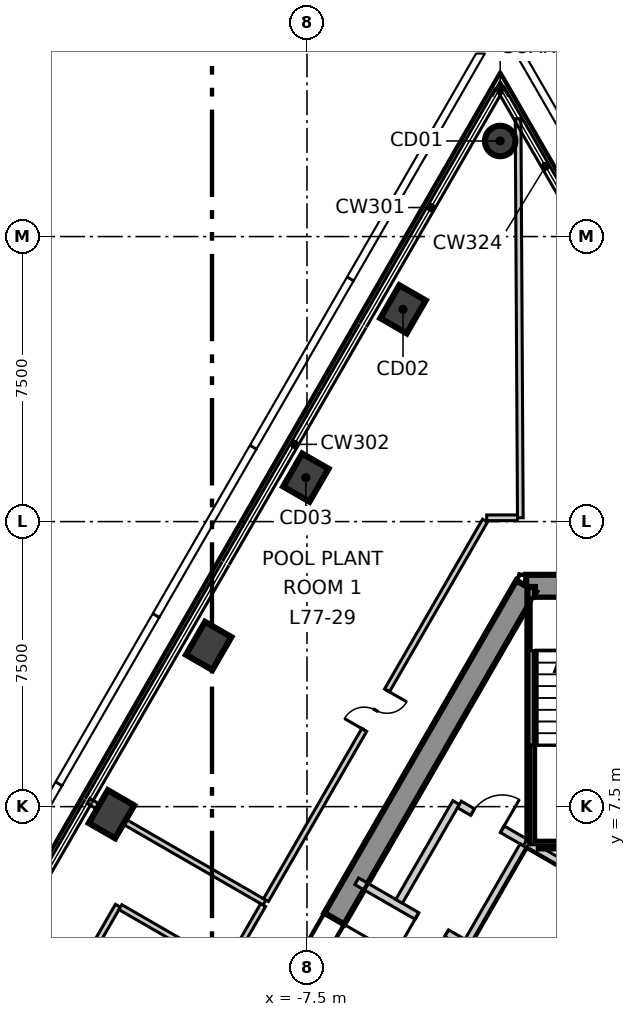
"""IFC4 building model, lengths in metres.
Left out: names, types, materials, properties, quantities, classifications, styles, units other than length and angle.
Written with IfcOpenShell. Run it as: python <this file> out.ifc"""

import sys

from ifc_helpers import new_model, si_unit, direction, frame, frame_2d, origin, origin_2d, place, context, subcontext, project, spatial, polyline, rectangle, circle, outline, extrude, element, fill, save


model = new_model("IFC4")
c1 = context("Model", 3, precision=1e-05, world=origin(), true_north=direction((0.0, 1.0)))
c2 = subcontext(c1, "Body", "Model", "MODEL_VIEW")
j1 = project(units=[si_unit("LENGTHUNIT", "METRE"), si_unit("PLANEANGLEUNIT", "RADIAN")], contexts=[c1])
p1 = place(None, origin())
s1 = spatial("IfcSite", under=j1, at=p1, CompositionType="ELEMENT")
p2 = place(p1, origin())
s2 = spatial("IfcBuilding", under=s1, at=p2, CompositionType="ELEMENT")
p3 = place(p2, frame((0.0, 0.0, 322.3)))
s3 = spatial("IfcBuildingStorey", under=s2, at=p3, CompositionType="ELEMENT", Elevation=322.3)
p4 = place(p3, frame((1.732, 13.3, -0.3), z_axis=(0.0, 0.0, 1.0), x_axis=(-1.0, 0.0, 0.0)))
e1 = element("IfcWall", 1, at=p4, inside=s3, PredefinedType="SHEAR", context=c2, shape_type="SweptSolid", body=[
    extrude(outline(polyline([(-0.173, -0.3), (1.732, -0.3), (3.637, -0.3), (3.291, 0.3), (1.732, 0.3), (0.173, 0.3), (-0.173, -0.3)])), origin(), (0.0, 0.0, 1.0), 5.35),
])
p5 = place(p4, frame((1.032, 0.0, 0.3)))
e2 = element("IfcOpeningElement", 2, at=p5, cuts=e1, PredefinedType="OPENING", context=c2, shape_type="SweptSolid", body=[
    extrude(rectangle(XDim=1.4, YDim=2.1, at=frame_2d((0.7, 1.05))), frame((0.0, 0.31, 0.0), z_axis=(0.0, -1.0, 0.0), x_axis=(1.0, 0.0, 0.0)), (0.0, 0.0, 1.0), 0.62),
])
p6 = place(p3, frame((-1.732, 13.3, -0.3), z_axis=(0.0, 0.0, 1.0), x_axis=(-0.500000539815, -0.866025092122, 0.0)))
e3 = element("IfcWall", 3, at=p6, inside=s3, PredefinedType="SHEAR", context=c2, shape_type="SweptSolid", body=[
    extrude(outline(polyline([(-0.173, -0.3), (1.795, -0.3), (3.763, -0.3), (5.732, -0.3), (7.7, -0.3), (9.668, -0.301), (11.637, -0.301), (13.605, -0.301), (15.573, -0.301), (17.542, -0.301), (19.51, -0.301), (21.478, -0.301), (21.131, 0.3), (19.226, 0.3), (17.321, 0.3), (15.415, 0.3), (13.51, 0.3), (11.605, 0.3), (9.699, 0.3), (7.794, 0.3), (5.889, 0.3), (3.984, 0.3), (2.078, 0.3), (0.173, 0.3), (-0.173, -0.3)])), origin(), (0.0, 0.0, 1.0), 5.35),
])
p7 = place(p6, frame((10.102, 0.0, 0.3)))
e4 = element("IfcOpeningElement", 4, at=p7, cuts=e3, PredefinedType="OPENING", context=c2, shape_type="SweptSolid", body=[
    extrude(rectangle(XDim=1.1, YDim=2.1, at=frame_2d((0.55, 1.05))), frame((0.0, 0.31, 0.0), z_axis=(0.0, -1.0, 0.0), x_axis=(1.0, 0.0, 0.0)), (0.0, 0.0, 1.0), 0.621),
])
p8 = place(p6, frame((16.378, 0.0, 0.3)))
e5 = element("IfcOpeningElement", 5, at=p8, cuts=e3, PredefinedType="OPENING", context=c2, shape_type="SweptSolid", body=[
    extrude(rectangle(XDim=0.9, YDim=2.1, at=frame_2d((0.45, 1.05))), frame((0.0, 0.31, 0.0), z_axis=(0.0, -1.0, 0.0), x_axis=(1.0, 0.0, 0.0)), (0.0, 0.0, 1.0), 0.621),
])
p9 = place(p3, frame((-2.416, 25.015, -0.3), z_axis=(0.0, 0.0, 1.0), x_axis=(0.5, 0.866025403784, 0.0)))
e6 = element("IfcColumn", 6, at=p9, inside=s3, PredefinedType="COLUMN", context=c2, shape_type="SweptSolid", body=[
    extrude(circle(Radius=0.4, at=origin_2d()), origin(), (0.0, 0.0, 1.0), 5.35),
])
for number, where, z_axis, x_axis in (
    (7, (-4.973, 20.586, -0.3), (0.0, 0.0, 1.0), (0.5, 0.866, 0.0)),
    (8, (-7.53, 16.157, -0.3), (0.0, 0.0, 1.0), (0.5, 0.866, 0.0)),
    (9, (-10.087, 11.729, -0.3), (0.0, 0.0, 1.0), (0.5, 0.866, 0.0)),
    (10, (-12.644, 7.3, -0.3), (0.0, 0.0, 1.0), (0.5, 0.866, 0.0)),
):
    element("IfcColumn", number, at=place(p3, frame(where, z_axis=z_axis, x_axis=x_axis)), inside=s3, PredefinedType="COLUMN", context=c2, shape_type="SweptSolid", body=[
        extrude(rectangle(XDim=1.0, YDim=0.8, at=origin_2d()), origin(), (0.0, 0.0, 1.0), 5.35),
    ])
p10 = place(p3, frame((-13.25, 7.65, 0.0), z_axis=(0.0, 0.0, 1.0), x_axis=(0.866032834954, -0.499987128616, 0.0)))
e11 = element("IfcWall", 11, at=p10, inside=s3, PredefinedType="PARTITIONING", context=c2, shape_type="SweptSolid", body=[
    extrude(rectangle(XDim=5.35, YDim=0.15, at=frame_2d((2.675, 0.0))), origin(), (0.0, 0.0, 1.0), 5.05),
])
p11 = place(p3, frame((-1.945, 25.6, 0.0), z_axis=(0.0, 0.0, 1.0), x_axis=(0.005626771044, -0.999984169599, 0.0)))
e12 = element("IfcWall", 12, at=p11, inside=s3, PredefinedType="PARTITIONING", context=c2, shape_type="SweptSolid", body=[
    extrude(rectangle(XDim=10.5, YDim=0.15, at=frame_2d((5.25, 0.0))), origin(), (0.0, 0.0, 1.0), 5.05),
])
p12 = place(p3, frame((-2.771, 15.1, 0.0), z_axis=(0.0, 0.0, 1.0), x_axis=(1.0, 0.0, 0.0)))
e13 = element("IfcWall", 13, at=p12, inside=s3, PredefinedType="PARTITIONING", context=c2, shape_type="SweptSolid", body=[
    extrude(rectangle(XDim=0.81, YDim=0.15, at=frame_2d((0.405, 0.0))), origin(), (0.0, 0.0, 1.0), 5.05),
])
p13 = place(p3, frame((-8.579, 5.04, 0.0), z_axis=(0.0, 0.0, 1.0), x_axis=(0.499960750514, 0.8660480633, 0.0)))
e14 = element("IfcWall", 14, at=p13, inside=s3, PredefinedType="PARTITIONING", context=c2, shape_type="SweptSolid", body=[
    extrude(rectangle(XDim=11.529, YDim=0.15, at=frame_2d((5.765, 0.0))), origin(), (0.0, 0.0, 1.0), 5.05),
])
p14 = place(p13, frame((5.17, 0.0, 0.0)))
e15 = element("IfcOpeningElement", 15, at=p14, cuts=e14, PredefinedType="OPENING", context=c2, shape_type="SweptSolid", body=[
    extrude(rectangle(XDim=1.2, YDim=2.1, at=frame_2d((0.6, 1.05))), frame((0.0, 0.085, 0.0), z_axis=(0.0, -1.0, 0.0), x_axis=(1.0, 0.0, 0.0)), (0.0, 0.0, 1.0), 0.17),
])
p15 = place(p3, frame((-14.463, -5.15, 0.0), z_axis=(0.0, 0.0, 1.0), x_axis=(0.50005173435, 0.865995532883, 0.0)))
e16 = element("IfcWall", 16, at=p15, inside=s3, PredefinedType="PARTITIONING", context=c2, shape_type="SweptSolid", body=[
    extrude(rectangle(XDim=11.616, YDim=0.15, at=frame_2d((5.808, 0.0))), origin(), (0.0, 0.0, 1.0), 5.05),
])
p16 = place(p15, frame((7.542, 0.0, 0.0)))
e17 = element("IfcOpeningElement", 17, at=p16, cuts=e16, PredefinedType="OPENING", context=c2, shape_type="SweptSolid", body=[
    extrude(rectangle(XDim=1.0, YDim=2.1, at=frame_2d((0.5, 1.05))), frame((0.0, 0.085, 0.0), z_axis=(0.0, -1.0, 0.0), x_axis=(1.0, 0.0, 0.0)), (0.0, 0.0, 1.0), 0.17),
])
p17 = place(p3, frame((-14.087, 2.1, 0.0), z_axis=(0.0, 0.0, 1.0), x_axis=(0.499836055896, 0.866120036269, 0.0)))
e18 = element("IfcWall", 18, at=p17, inside=s3, PredefinedType="PARTITIONING", context=c2, shape_type="SweptSolid", body=[
    extrude(rectangle(XDim=3.225, YDim=0.15, at=frame_2d((1.612, 0.0))), origin(), (0.0, 0.0, 1.0), 5.05),
])
p18 = place(p3, frame((-12.41, 4.855, 0.0), z_axis=(0.0, 0.0, 1.0), x_axis=(0.866035871367, -0.499981869177, 0.0)))
e19 = element("IfcWall", 19, at=p18, inside=s3, PredefinedType="PARTITIONING", context=c2, shape_type="SweptSolid", body=[
    extrude(rectangle(XDim=3.15, YDim=0.15, at=frame_2d((1.575, 0.0))), origin(), (0.0, 0.0, 1.0), 5.05),
])
p19 = place(p3, frame((-6.191, 5.537, 0.0), z_axis=(0.0, 0.0, 1.0), x_axis=(0.866052607023, -0.499952879648, 0.0)))
e20 = element("IfcWall", 20, at=p19, inside=s3, PredefinedType="SOLIDWALL", context=c2, shape_type="SweptSolid", body=[
    extrude(rectangle(XDim=3.332, YDim=0.2, at=frame_2d((1.666, 0.0))), origin(), (0.0, 0.0, 1.0), 5.05),
])
p20 = place(p19, frame((1.83, 0.0, 0.0)))
e21 = element("IfcOpeningElement", 21, at=p20, cuts=e20, PredefinedType="OPENING", context=c2, shape_type="SweptSolid", body=[
    extrude(rectangle(XDim=0.9, YDim=2.1, at=frame_2d((0.45, 1.05))), frame((0.0, 0.11, 0.0), z_axis=(0.0, -1.0, 0.0), x_axis=(1.0, 0.0, 0.0)), (0.0, 0.0, 1.0), 0.22),
])
p21 = place(p3, frame((-5.076, 5.009, 0.0), z_axis=(0.0, 0.0, 1.0), x_axis=(0.50002537861, 0.866010750942, 0.0)))
e22 = element("IfcWall", 22, at=p21, inside=s3, PredefinedType="SOLIDWALL", context=c2, shape_type="SweptSolid", body=[
    extrude(rectangle(XDim=3.0, YDim=0.2, at=frame_2d((1.5, 0.0))), origin(), (0.0, 0.0, 1.0), 5.05),
])
p22 = place(p3, frame((-3.489, 7.557, 0.0), z_axis=(0.0, 0.0, 1.0), x_axis=(0.866010750942, -0.50002537861, 0.0)))
e23 = element("IfcWall", 23, at=p22, inside=s3, PredefinedType="SOLIDWALL", context=c2, shape_type="SweptSolid", body=[
    extrude(rectangle(XDim=2.0, YDim=0.2, at=frame_2d((1.0, 0.0))), origin(), (0.0, 0.0, 1.0), 5.05),
])
p23 = place(p22, frame((0.401, 0.0, 0.0)))
e24 = element("IfcOpeningElement", 24, at=p23, cuts=e23, PredefinedType="OPENING", context=c2, shape_type="SweptSolid", body=[
    extrude(rectangle(XDim=0.9, YDim=2.1, at=frame_2d((0.45, 1.05))), frame((0.0, 0.11, 0.0), z_axis=(0.0, -1.0, 0.0), x_axis=(1.0, 0.0, 0.0)), (0.0, 0.0, 1.0), 0.22),
])
p24 = place(p3, frame((-3.257, 3.959, 0.0), z_axis=(0.0, 0.0, 1.0), x_axis=(0.50012328804, 0.865954211699, 0.0)))
e25 = element("IfcWall", 25, at=p24, inside=s3, PredefinedType="SOLIDWALL", context=c2, shape_type="SweptSolid", body=[
    extrude(rectangle(XDim=2.9, YDim=0.2, at=frame_2d((1.45, 0.0))), origin(), (0.0, 0.0, 1.0), 5.05),
])
p25 = place(p3, frame((-1.67, 6.507, 0.0), z_axis=(0.0, 0.0, 1.0), x_axis=(0.865941441609, -0.500145398563, 0.0)))
e26 = element("IfcWall", 26, at=p25, inside=s3, PredefinedType="SOLIDWALL", context=c2, shape_type="SweptSolid", body=[
    extrude(rectangle(XDim=1.815, YDim=0.2, at=frame_2d((0.908, 0.0))), origin(), (0.0, 0.0, 1.0), 5.05),
])
p26 = place(p3, frame((-1.438, 2.909, 0.0), z_axis=(0.0, 0.0, 1.0), x_axis=(0.499829630636, 0.866123744241, 0.0)))
e27 = element("IfcWall", 27, at=p26, inside=s3, PredefinedType="SOLIDWALL", context=c2, shape_type="SweptSolid", body=[
    extrude(rectangle(XDim=2.761, YDim=0.2, at=frame_2d((1.38, 0.0))), origin(), (0.0, 0.0, 1.0), 5.05),
])
p27 = place(p3, frame((-1.4, 6.5, 0.0), z_axis=(0.0, 0.0, 1.0), x_axis=(1.0, 0.0, 0.0)))
e28 = element("IfcWall", 28, at=p27, inside=s3, PredefinedType="SOLIDWALL", context=c2, shape_type="SweptSolid", body=[
    extrude(rectangle(XDim=2.8, YDim=0.2, at=frame_2d((1.4, 0.0))), origin(), (0.0, 0.0, 1.0), 5.05),
])
p28 = place(p3, frame((-1.6, 6.615, 0.0), z_axis=(0.0, 0.0, 1.0), x_axis=(0.0, 1.0, 0.0)))
e29 = element("IfcWall", 29, at=p28, inside=s3, PredefinedType="SOLIDWALL", context=c2, shape_type="SweptSolid", body=[
    extrude(rectangle(XDim=6.665, YDim=0.2, at=frame_2d((3.333, 0.0))), origin(), (0.0, 0.0, 1.0), 5.05),
])
p29 = place(p20, origin())
e30 = element("IfcDoor", 30, at=p29, inside=s3, OperationType="SINGLE_SWING_LEFT", PredefinedType="DOOR", context=c2, shape_type="SweptSolid", body=[
    extrude(rectangle(XDim=0.9, YDim=2.1, at=frame_2d((0.45, 1.05))), frame((0.0, 0.025, 0.0), z_axis=(0.0, -1.0, 0.0), x_axis=(1.0, 0.0, 0.0)), (0.0, 0.0, 1.0), 0.05),
])
fill(e21, e30)
p30 = place(p14, origin())
e31 = element("IfcDoor", 31, at=p30, inside=s3, OperationType="DOUBLE_DOOR_SINGLE_SWING", PredefinedType="DOOR", context=c2, shape_type="SweptSolid", body=[
    extrude(rectangle(XDim=1.2, YDim=2.1, at=frame_2d((0.6, 1.05))), frame((0.0, 0.025, 0.0), z_axis=(0.0, -1.0, 0.0), x_axis=(1.0, 0.0, 0.0)), (0.0, 0.0, 1.0), 0.05),
])
fill(e15, e31)
p31 = place(p7, origin())
e32 = element("IfcDoor", 32, at=p31, inside=s3, OperationType="SINGLE_SWING_RIGHT", PredefinedType="DOOR", context=c2, shape_type="SweptSolid", body=[
    extrude(rectangle(XDim=1.1, YDim=2.1, at=frame_2d((0.55, 1.05))), frame((0.0, 0.025, 0.0), z_axis=(0.0, -1.0, 0.0), x_axis=(1.0, 0.0, 0.0)), (0.0, 0.0, 1.0), 0.05),
])
fill(e4, e32)
p32 = place(p23, origin())
e33 = element("IfcDoor", 33, at=p32, inside=s3, OperationType="SINGLE_SWING_LEFT", PredefinedType="DOOR", context=c2, shape_type="SweptSolid", body=[
    extrude(rectangle(XDim=0.9, YDim=2.1, at=frame_2d((0.45, 1.05))), frame((0.0, 0.025, 0.0), z_axis=(0.0, -1.0, 0.0), x_axis=(1.0, 0.0, 0.0)), (0.0, 0.0, 1.0), 0.05),
])
fill(e24, e33)
save(model, sys.argv[1])
